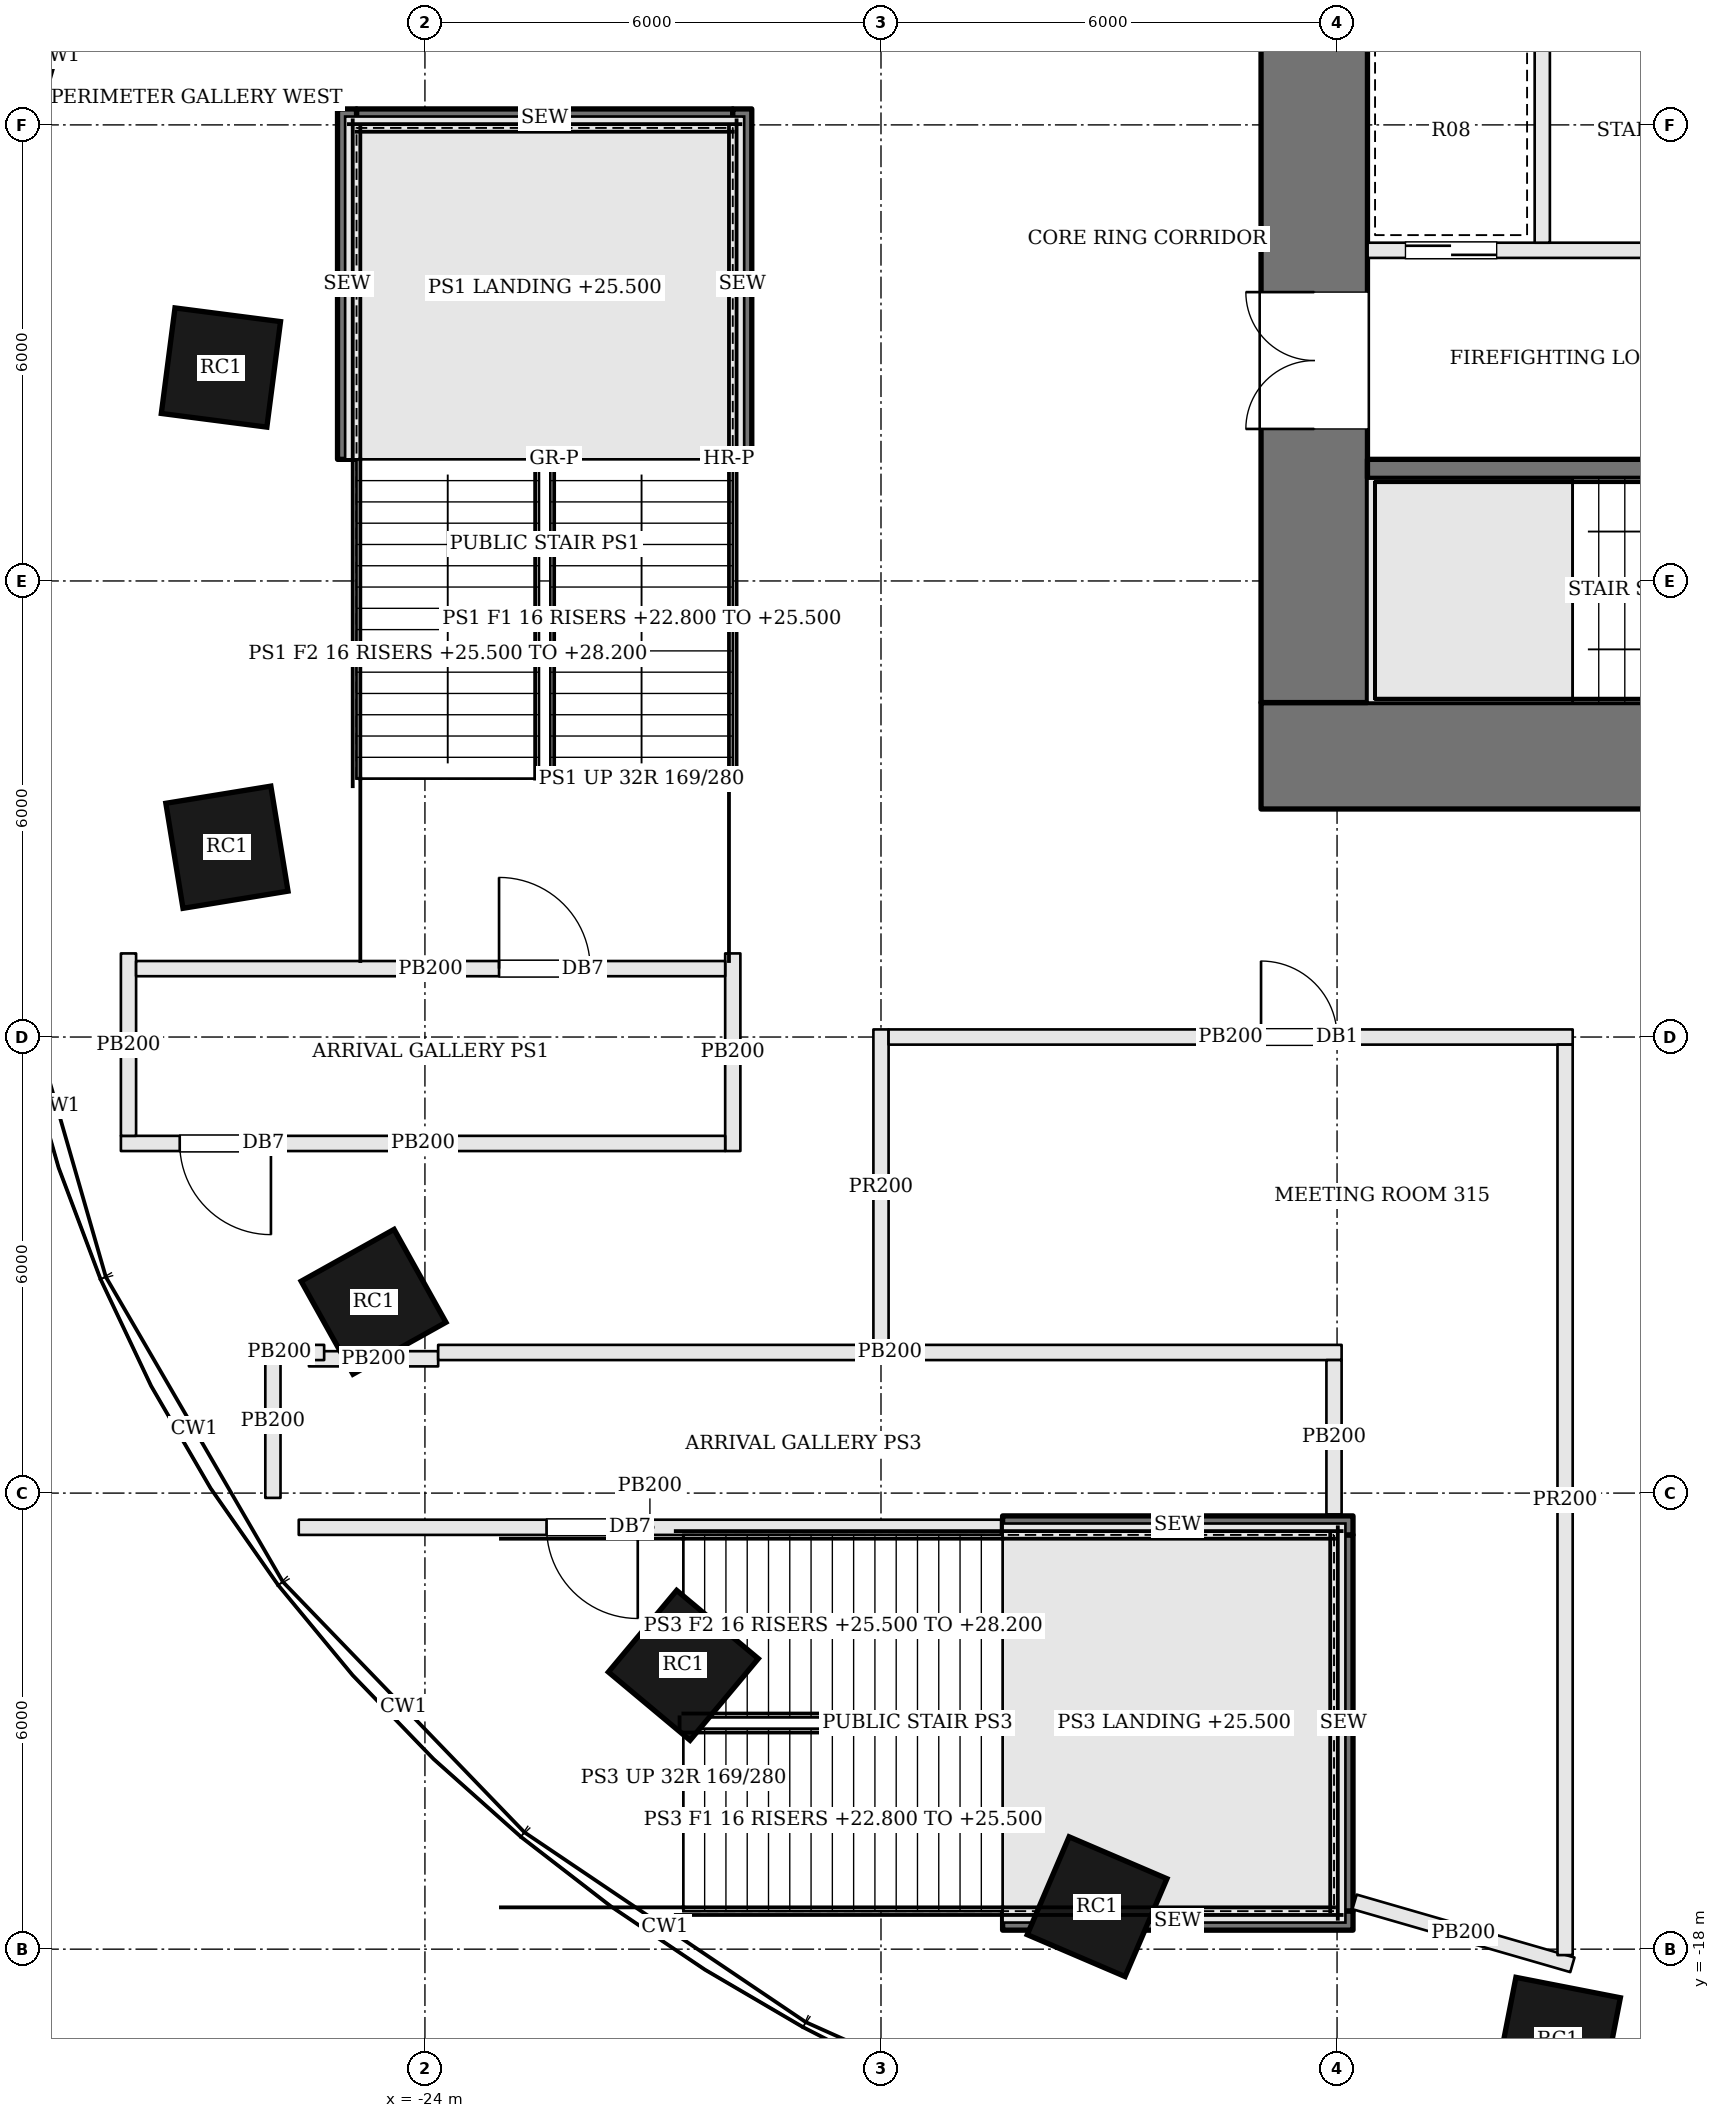
"""IFC4 building model, lengths in metres.
Left out: names, types, materials, properties, quantities, classifications, styles, units other than length and angle.
Written with IfcOpenShell. Run it as: python <this file> out.ifc"""

import sys

from ifc_helpers import new_model, si_unit, direction, frame, frame_2d, origin, origin_2d, place, context, subcontext, project, spatial, rectangle, extrude, element, fill, save


model = new_model("IFC4")
c1 = context("Model", 3, precision=1e-05, world=origin(), true_north=direction((0.0, 1.0)))
c2 = subcontext(c1, "Body", "Model", "MODEL_VIEW")
j1 = project(units=[si_unit("LENGTHUNIT", "METRE"), si_unit("PLANEANGLEUNIT", "RADIAN")], contexts=[c1])
p1 = place(None, origin())
s1 = spatial("IfcSite", under=j1, at=p1, CompositionType="ELEMENT")
p2 = place(p1, origin())
s2 = spatial("IfcBuilding", under=s1, at=p2, CompositionType="ELEMENT")
p3 = place(p2, frame((0.0, 0.0, 22.8)))
s3 = spatial("IfcBuildingStorey", under=s2, at=p3, CompositionType="ELEMENT", Elevation=22.8)
p4 = place(p3, frame((-13.0, -2.3, 0.0), z_axis=(0.0, 0.0, 1.0), x_axis=(1.0, 0.0, 0.0)))
e1 = element("IfcWall", 1, at=p4, inside=s3, PredefinedType="SHEAR", context=c2, shape_type="SweptSolid", body=[
    extrude(rectangle(XDim=26.0, YDim=1.4, at=frame_2d((13.0, 0.0))), origin(), (0.0, 0.0, 1.0), 5.4),
])
p5 = place(p4, frame((9.3, 0.0, 0.0)))
e2 = element("IfcOpeningElement", 2, at=p5, cuts=e1, PredefinedType="OPENING", context=c2, shape_type="SweptSolid", body=[
    extrude(rectangle(XDim=0.9, YDim=2.1, at=frame_2d((0.45, 1.05))), frame((0.0, 0.71, 0.0), z_axis=(0.0, -1.0, 0.0), x_axis=(1.0, 0.0, 0.0)), (0.0, 0.0, 1.0), 1.42),
])
p6 = place(p4, frame((12.5, 0.0, 0.0)))
e3 = element("IfcOpeningElement", 3, at=p6, cuts=e1, PredefinedType="OPENING", context=c2, shape_type="SweptSolid", body=[
    extrude(rectangle(XDim=0.9, YDim=2.1, at=frame_2d((0.45, 1.05))), frame((0.0, 0.71, 0.0), z_axis=(0.0, -1.0, 0.0), x_axis=(1.0, 0.0, 0.0)), (0.0, 0.0, 1.0), 1.42),
])
p7 = place(p4, frame((14.9, 0.0, 0.0)))
e4 = element("IfcOpeningElement", 4, at=p7, cuts=e1, PredefinedType="OPENING", context=c2, shape_type="SweptSolid", body=[
    extrude(rectangle(XDim=1.0, YDim=2.1, at=frame_2d((0.5, 1.05))), frame((0.0, 0.71, 0.0), z_axis=(0.0, -1.0, 0.0), x_axis=(1.0, 0.0, 0.0)), (0.0, 0.0, 1.0), 1.42),
])
p8 = place(p4, frame((16.6, 0.0, 0.0)))
e5 = element("IfcOpeningElement", 5, at=p8, cuts=e1, PredefinedType="OPENING", context=c2, shape_type="SweptSolid", body=[
    extrude(rectangle(XDim=1.0, YDim=2.1, at=frame_2d((0.5, 1.05))), frame((0.0, 0.71, 0.0), z_axis=(0.0, -1.0, 0.0), x_axis=(1.0, 0.0, 0.0)), (0.0, 0.0, 1.0), 1.42),
])
p9 = place(p3, frame((-12.3, -1.6, 0.0), z_axis=(0.0, 0.0, 1.0), x_axis=(0.0, 1.0, 0.0)))
e6 = element("IfcWall", 6, at=p9, inside=s3, PredefinedType="SHEAR", context=c2, shape_type="SweptSolid", body=[
    extrude(rectangle(XDim=12.2, YDim=1.4, at=frame_2d((6.1, 0.0))), origin(), (0.0, 0.0, 1.0), 5.4),
])
p10 = place(p9, frame((3.6, 0.0, 0.0)))
e7 = element("IfcOpeningElement", 7, at=p10, cuts=e6, PredefinedType="OPENING", context=c2, shape_type="SweptSolid", body=[
    extrude(rectangle(XDim=1.8, YDim=2.1, at=frame_2d((0.9, 1.05))), frame((0.0, 0.71, 0.0), z_axis=(0.0, -1.0, 0.0), x_axis=(1.0, 0.0, 0.0)), (0.0, 0.0, 1.0), 1.42),
])
for number, where, z_axis, x_axis in (
    (8, (-26.684, 2.808, 0.0), (0.0, 0.0, 1.0), (-0.128, -0.992, 0.0)),
    (9, (-26.605, -3.503, 0.0), (0.0, 0.0, 1.0), (0.161, -0.987, 0.0)),
    (10, (-24.676, -9.483, 0.0), (0.0, 0.0, 1.0), (0.487, -0.873, 0.0)),
    (11, (-20.6, -14.266, 0.0), (0.0, 0.0, 1.0), (0.767, -0.641, 0.0)),
    (12, (-15.157, -17.441, 0.0), (0.0, 0.0, 1.0), (0.919, -0.394, 0.0)),
    (13, (-9.094, -19.192, 0.0), (0.0, 0.0, 1.0), (0.981, -0.192, 0.0)),
):
    element("IfcColumn", number, at=place(p3, frame(where, z_axis=z_axis, x_axis=x_axis)), inside=s3, PredefinedType="COLUMN", context=c2, shape_type="SweptSolid", body=[
        extrude(rectangle(XDim=1.4, YDim=1.4, at=origin_2d()), origin(), (0.0, 0.0, 1.0), 5.4),
    ])
p11 = place(p3, frame((-11.6, 1.475, 0.0), z_axis=(0.0, 0.0, 1.0), x_axis=(1.0, 0.0, 0.0)))
e14 = element("IfcWall", 14, at=p11, inside=s3, PredefinedType="SOLIDWALL", context=c2, shape_type="SweptSolid", body=[
    extrude(rectangle(XDim=6.5, YDim=0.25, at=frame_2d((3.25, 0.0))), origin(), (0.0, 0.0, 1.0), 5.15),
])
p12 = place(p11, frame((5.2, 0.0, 0.0)))
e15 = element("IfcOpeningElement", 15, at=p12, cuts=e14, PredefinedType="OPENING", context=c2, shape_type="SweptSolid", body=[
    extrude(rectangle(XDim=1.2, YDim=2.1, at=frame_2d((0.6, 1.05))), frame((0.0, 0.135, 0.0), z_axis=(0.0, -1.0, 0.0), x_axis=(1.0, 0.0, 0.0)), (0.0, 0.0, 1.0), 0.27),
])
p13 = place(p3, frame((-11.6, 4.35, 0.0), z_axis=(0.0, 0.0, 1.0), x_axis=(1.0, 0.0, 0.0)))
e16 = element("IfcWall", 16, at=p13, inside=s3, PredefinedType="SOLIDWALL", context=c2, shape_type="SweptSolid", body=[
    extrude(rectangle(XDim=6.5, YDim=0.2, at=frame_2d((3.25, 0.0))), origin(), (0.0, 0.0, 1.0), 5.15),
])
p14 = place(p13, frame((3.8, 0.0, 0.0)))
e17 = element("IfcOpeningElement", 17, at=p14, cuts=e16, PredefinedType="OPENING", context=c2, shape_type="SweptSolid", body=[
    extrude(rectangle(XDim=1.2, YDim=2.1, at=frame_2d((0.6, 1.05))), frame((0.0, 0.11, 0.0), z_axis=(0.0, -1.0, 0.0), x_axis=(1.0, 0.0, 0.0)), (0.0, 0.0, 1.0), 0.22),
])
p15 = place(p13, frame((0.5, 0.0, 0.0)))
e18 = element("IfcOpeningElement", 18, at=p15, cuts=e16, PredefinedType="OPENING", context=c2, shape_type="SweptSolid", body=[
    extrude(rectangle(XDim=1.2, YDim=2.1, at=frame_2d((0.6, 1.05))), frame((0.0, 0.11, 0.0), z_axis=(0.0, -1.0, 0.0), x_axis=(1.0, 0.0, 0.0)), (0.0, 0.0, 1.0), 0.22),
])
p16 = place(p3, frame((-9.3, 4.45, 0.0), z_axis=(0.0, 0.0, 1.0), x_axis=(0.0, 1.0, 0.0)))
e19 = element("IfcWall", 19, at=p16, inside=s3, PredefinedType="SOLIDWALL", context=c2, shape_type="SweptSolid", body=[
    extrude(rectangle(XDim=3.0, YDim=0.2, at=frame_2d((1.5, 0.0))), origin(), (0.0, 0.0, 1.0), 5.15),
])
p17 = place(p3, frame((-19.95, -4.9, 0.0), z_axis=(0.0, 0.0, 1.0), x_axis=(0.0, -1.0, 0.0)))
e20 = element("IfcWall", 20, at=p17, inside=s3, PredefinedType="PARTITIONING", context=c2, shape_type="SweptSolid", body=[
    extrude(rectangle(XDim=2.6, YDim=0.2, at=frame_2d((1.3, 0.0))), origin(), (0.0, 0.0, 1.0), 4.43),
])
p18 = place(p3, frame((-20.05, -7.4, 0.0), z_axis=(0.0, 0.0, 1.0), x_axis=(-1.0, 0.0, 0.0)))
e21 = element("IfcWall", 21, at=p18, inside=s3, PredefinedType="PARTITIONING", context=c2, shape_type="SweptSolid", body=[
    extrude(rectangle(XDim=7.95, YDim=0.2, at=frame_2d((3.975, 0.0))), origin(), (0.0, 0.0, 1.0), 4.43),
])
p19 = place(p18, frame((5.976, 0.0, 0.0)))
e22 = element("IfcOpeningElement", 22, at=p19, cuts=e21, PredefinedType="OPENING", context=c2, shape_type="SweptSolid", body=[
    extrude(rectangle(XDim=1.2, YDim=2.1, at=frame_2d((0.6, 1.05))), frame((0.0, 0.11, 0.0), z_axis=(0.0, -1.0, 0.0), x_axis=(1.0, 0.0, 0.0)), (0.0, 0.0, 1.0), 0.22),
])
p20 = place(p3, frame((-27.9, -7.3, 0.0), z_axis=(0.0, 0.0, 1.0), x_axis=(0.0, 1.0, 0.0)))
e23 = element("IfcWall", 23, at=p20, inside=s3, PredefinedType="PARTITIONING", context=c2, shape_type="SweptSolid", body=[
    extrude(rectangle(XDim=2.4, YDim=0.2, at=frame_2d((1.2, 0.0))), origin(), (0.0, 0.0, 1.0), 4.43),
])
p21 = place(p3, frame((-27.8, -5.1, 0.0), z_axis=(0.0, 0.0, 1.0), x_axis=(1.0, 0.0, 0.0)))
e24 = element("IfcWall", 24, at=p21, inside=s3, PredefinedType="PARTITIONING", context=c2, shape_type="SweptSolid", body=[
    extrude(rectangle(XDim=7.75, YDim=0.2, at=frame_2d((3.875, 0.0))), origin(), (0.0, 0.0, 1.0), 4.43),
])
p22 = place(p21, frame((4.775, 0.0, 0.0)))
e25 = element("IfcOpeningElement", 25, at=p22, cuts=e24, PredefinedType="OPENING", context=c2, shape_type="SweptSolid", body=[
    extrude(rectangle(XDim=1.2, YDim=2.1, at=frame_2d((0.6, 1.05))), frame((0.0, 0.11, 0.0), z_axis=(0.0, -1.0, 0.0), x_axis=(1.0, 0.0, 0.0)), (0.0, 0.0, 1.0), 0.22),
])
p23 = place(p3, frame((-25.526, -10.233, 0.0), z_axis=(0.0, 0.0, 1.0), x_axis=(1.0, 0.0, 0.0)))
e26 = element("IfcWall", 26, at=p23, inside=s3, PredefinedType="PARTITIONING", context=c2, shape_type="SweptSolid", body=[
    extrude(rectangle(XDim=1.7, YDim=0.2, at=frame_2d((0.85, 0.0))), origin(), (0.0, 0.0, 1.0), 4.43),
])
p24 = place(p3, frame((-23.826, -10.15, 0.0), z_axis=(0.0, 0.0, 1.0), x_axis=(1.0, 0.0, 0.0)))
e27 = element("IfcWall", 27, at=p24, inside=s3, PredefinedType="PARTITIONING", context=c2, shape_type="SweptSolid", body=[
    extrude(rectangle(XDim=11.886, YDim=0.2, at=frame_2d((5.943, 0.0))), origin(), (0.0, 0.0, 1.0), 4.43),
])
p25 = place(p3, frame((-12.04, -10.25, 0.0), z_axis=(0.0, 0.0, 1.0), x_axis=(0.0, -1.0, 0.0)))
e28 = element("IfcWall", 28, at=p25, inside=s3, PredefinedType="PARTITIONING", context=c2, shape_type="SweptSolid", body=[
    extrude(rectangle(XDim=2.03, YDim=0.2, at=frame_2d((1.015, 0.0))), origin(), (0.0, 0.0, 1.0), 4.43),
])
p26 = place(p3, frame((-16.42, -12.45, 0.0), z_axis=(0.0, 0.0, 1.0), x_axis=(-1.0, 0.0, 0.0)))
e29 = element("IfcWall", 29, at=p26, inside=s3, PredefinedType="PARTITIONING", context=c2, shape_type="SweptSolid", body=[
    extrude(rectangle(XDim=9.24, YDim=0.2, at=frame_2d((4.62, 0.0))), origin(), (0.0, 0.0, 1.0), 4.43),
])
p27 = place(p26, frame((4.78, 0.0, 0.0)))
e30 = element("IfcOpeningElement", 30, at=p27, cuts=e29, PredefinedType="OPENING", context=c2, shape_type="SweptSolid", body=[
    extrude(rectangle(XDim=1.2, YDim=2.1, at=frame_2d((0.6, 1.05))), frame((0.0, 0.11, 0.0), z_axis=(0.0, -1.0, 0.0), x_axis=(1.0, 0.0, 0.0)), (0.0, 0.0, 1.0), 0.22),
])
p28 = place(p3, frame((-26.0, -12.063, 0.0), z_axis=(0.0, 0.0, 1.0), x_axis=(0.0, 1.0, 0.0)))
e31 = element("IfcWall", 31, at=p28, inside=s3, PredefinedType="PARTITIONING", context=c2, shape_type="SweptSolid", body=[
    extrude(rectangle(XDim=2.013, YDim=0.2, at=frame_2d((1.006, 0.0))), origin(), (0.0, 0.0, 1.0), 4.43),
])
p29 = place(p3, frame((-25.9, -10.15, 0.0), z_axis=(0.0, 0.0, 1.0), x_axis=(1.0, 0.0, 0.0)))
e32 = element("IfcWall", 32, at=p29, inside=s3, PredefinedType="PARTITIONING", context=c2, shape_type="SweptSolid", body=[
    extrude(rectangle(XDim=0.574, YDim=0.2, at=frame_2d((0.287, 0.0))), origin(), (0.0, 0.0, 1.0), 4.43),
])
p30 = place(p3, frame((-8.904, -18.206, 0.0), z_axis=(0.0, 0.0, 1.0), x_axis=(-0.960698179161, 0.277595044187, 0.0)))
e33 = element("IfcWall", 33, at=p30, inside=s3, PredefinedType="PARTITIONING", context=c2, shape_type="SweptSolid", body=[
    extrude(rectangle(XDim=2.983, YDim=0.2, at=frame_2d((1.492, 0.0))), origin(), (0.0, 0.0, 1.0), 4.43),
])
p31 = place(p3, frame((-18.0, -10.05, 0.0), z_axis=(0.0, 0.0, 1.0), x_axis=(0.0, 1.0, 0.0)))
e34 = element("IfcWall", 34, at=p31, inside=s3, PredefinedType="PARTITIONING", context=c2, shape_type="SweptSolid", body=[
    extrude(rectangle(XDim=4.15, YDim=0.2, at=frame_2d((2.075, 0.0))), origin(), (0.0, 0.0, 1.0), 4.43),
])
p32 = place(p3, frame((-17.9, -6.0, 0.0), z_axis=(0.0, 0.0, 1.0), x_axis=(1.0, 0.0, 0.0)))
e35 = element("IfcWall", 35, at=p32, inside=s3, PredefinedType="PARTITIONING", context=c2, shape_type="SweptSolid", body=[
    extrude(rectangle(XDim=9.0, YDim=0.2, at=frame_2d((4.5, 0.0))), origin(), (0.0, 0.0, 1.0), 4.43),
])
p33 = place(p32, frame((4.9, 0.0, 0.0)))
e36 = element("IfcOpeningElement", 36, at=p33, cuts=e35, PredefinedType="OPENING", context=c2, shape_type="SweptSolid", body=[
    extrude(rectangle(XDim=1.0, YDim=2.1, at=frame_2d((0.5, 1.05))), frame((0.0, 0.11, 0.0), z_axis=(0.0, -1.0, 0.0), x_axis=(1.0, 0.0, 0.0)), (0.0, 0.0, 1.0), 0.22),
])
p34 = place(p3, frame((-9.0, -6.1, 0.0), z_axis=(0.0, 0.0, 1.0), x_axis=(0.0, -1.0, 0.0)))
e37 = element("IfcWall", 37, at=p34, inside=s3, PredefinedType="PARTITIONING", context=c2, shape_type="SweptSolid", body=[
    extrude(rectangle(XDim=11.978, YDim=0.2, at=frame_2d((5.989, 0.0))), origin(), (0.0, 0.0, 1.0), 4.43),
])
p35 = place(p3, frame((-19.95, 6.085, 0.0), z_axis=(0.0, 0.0, 1.0), x_axis=(-1.0, 0.0, 0.0)))
e38 = element("IfcWall", 38, at=p35, inside=s3, PredefinedType="SOLIDWALL", context=c2, shape_type="SweptSolid", body=[
    extrude(rectangle(XDim=4.95, YDim=0.25, at=frame_2d((2.475, 0.0))), origin(), (0.0, 0.0, 1.0), 5.15),
])
for number, where, z_axis, x_axis in (
    (39, (-25.025, 1.6, 0.0), (0.0, 0.0, 1.0), (0.0, 1.0, 0.0)),
    (40, (-19.825, 1.6, 0.0), (0.0, 0.0, 1.0), (0.0, 1.0, 0.0)),
):
    element("IfcWall", number, at=place(p3, frame(where, z_axis=z_axis, x_axis=x_axis)), inside=s3, PredefinedType="SOLIDWALL", context=c2, shape_type="SweptSolid", body=[
        extrude(rectangle(XDim=4.61, YDim=0.25, at=frame_2d((2.305, 0.0))), origin(), (0.0, 0.0, 1.0), 5.15),
    ])
p36 = place(p3, frame((-11.915, -17.5, 0.0), z_axis=(0.0, 0.0, 1.0), x_axis=(0.0, 1.0, 0.0)))
e41 = element("IfcWall", 41, at=p36, inside=s3, PredefinedType="SOLIDWALL", context=c2, shape_type="SweptSolid", body=[
    extrude(rectangle(XDim=4.95, YDim=0.25, at=frame_2d((2.475, 0.0))), origin(), (0.0, 0.0, 1.0), 5.15),
])
for number, where, z_axis, x_axis in (
    (42, (-16.4, -17.625, 0.0), (0.0, 0.0, 1.0), (1.0, 0.0, 0.0)),
    (43, (-16.4, -12.425, 0.0), (0.0, 0.0, 1.0), (1.0, 0.0, 0.0)),
):
    element("IfcWall", number, at=place(p3, frame(where, z_axis=z_axis, x_axis=x_axis)), inside=s3, PredefinedType="SOLIDWALL", context=c2, shape_type="SweptSolid", body=[
        extrude(rectangle(XDim=4.61, YDim=0.25, at=frame_2d((2.305, 0.0))), origin(), (0.0, 0.0, 1.0), 5.15),
    ])
p37 = place(p10, origin())
e44 = element("IfcDoor", 44, at=p37, inside=s3, OperationType="DOUBLE_DOOR_SINGLE_SWING", PredefinedType="DOOR", context=c2, shape_type="SweptSolid", body=[
    extrude(rectangle(XDim=1.8, YDim=2.1, at=frame_2d((0.9, 1.05))), frame((0.0, 0.025, 0.0), z_axis=(0.0, -1.0, 0.0), x_axis=(1.0, 0.0, 0.0)), (0.0, 0.0, 1.0), 0.05),
])
fill(e7, e44)
p38 = place(p15, origin())
e45 = element("IfcDoor", 45, at=p38, inside=s3, OperationType="SLIDING_TO_RIGHT", PredefinedType="DOOR", context=c2, shape_type="SweptSolid", body=[
    extrude(rectangle(XDim=1.2, YDim=2.1, at=frame_2d((0.6, 1.05))), frame((0.0, 0.025, 0.0), z_axis=(0.0, -1.0, 0.0), x_axis=(1.0, 0.0, 0.0)), (0.0, 0.0, 1.0), 0.05),
])
fill(e18, e45)
p39 = place(p22, origin())
e46 = element("IfcDoor", 46, at=p39, inside=s3, OperationType="SINGLE_SWING_LEFT", PredefinedType="DOOR", context=c2, shape_type="SweptSolid", body=[
    extrude(rectangle(XDim=1.2, YDim=2.1, at=frame_2d((0.6, 1.05))), frame((0.0, 0.025, 0.0), z_axis=(0.0, -1.0, 0.0), x_axis=(1.0, 0.0, 0.0)), (0.0, 0.0, 1.0), 0.05),
])
fill(e25, e46)
p40 = place(p19, origin())
e47 = element("IfcDoor", 47, at=p40, inside=s3, OperationType="SINGLE_SWING_LEFT", PredefinedType="DOOR", context=c2, shape_type="SweptSolid", body=[
    extrude(rectangle(XDim=1.2, YDim=2.1, at=frame_2d((0.6, 1.05))), frame((0.0, 0.025, 0.0), z_axis=(0.0, -1.0, 0.0), x_axis=(1.0, 0.0, 0.0)), (0.0, 0.0, 1.0), 0.05),
])
fill(e22, e47)
p41 = place(p27, origin())
e48 = element("IfcDoor", 48, at=p41, inside=s3, OperationType="SINGLE_SWING_LEFT", PredefinedType="DOOR", context=c2, shape_type="SweptSolid", body=[
    extrude(rectangle(XDim=1.2, YDim=2.1, at=frame_2d((0.6, 1.05))), frame((0.0, 0.025, 0.0), z_axis=(0.0, -1.0, 0.0), x_axis=(1.0, 0.0, 0.0)), (0.0, 0.0, 1.0), 0.05),
])
fill(e30, e48)
p42 = place(p33, origin())
e49 = element("IfcDoor", 49, at=p42, inside=s3, OperationType="SINGLE_SWING_LEFT", PredefinedType="DOOR", context=c2, shape_type="SweptSolid", body=[
    extrude(rectangle(XDim=1.0, YDim=2.1, at=frame_2d((0.5, 1.05))), frame((0.0, 0.025, 0.0), z_axis=(0.0, -1.0, 0.0), x_axis=(1.0, 0.0, 0.0)), (0.0, 0.0, 1.0), 0.05),
])
fill(e36, e49)
save(model, sys.argv[1])
